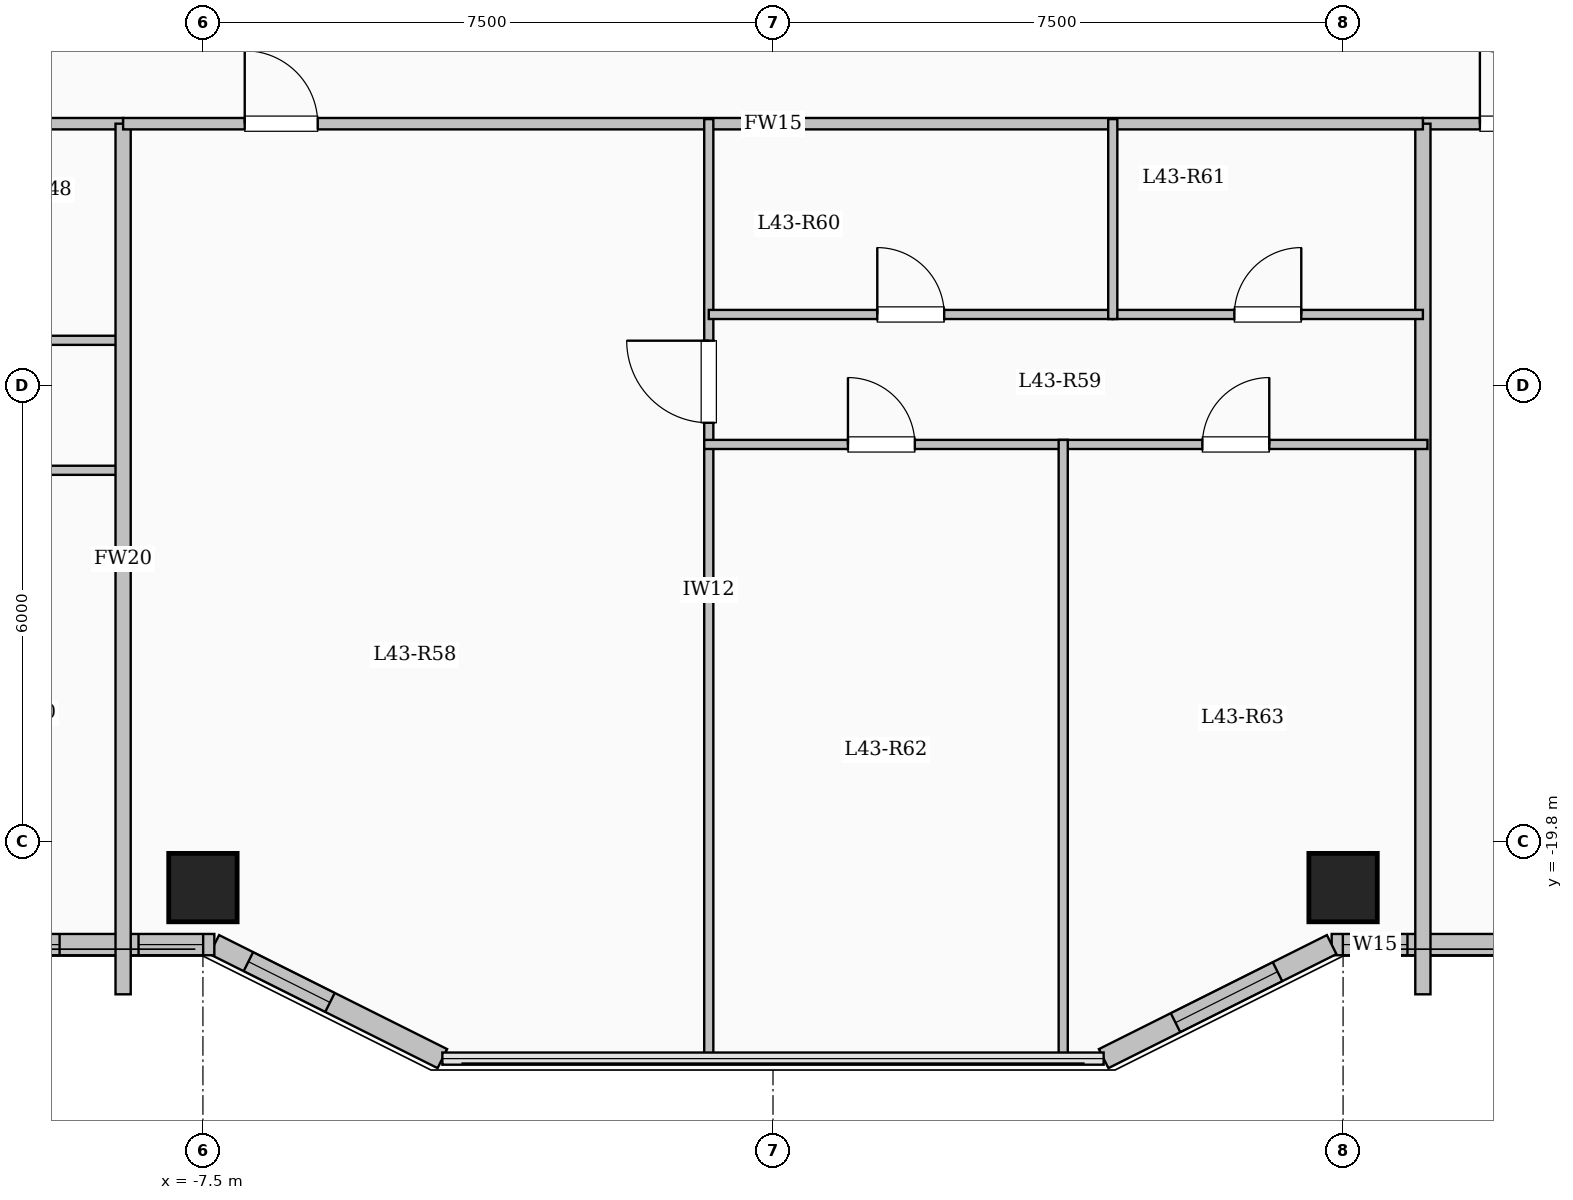
"""IFC4 building model, lengths in metres.
Left out: names, types, materials, properties, quantities, classifications, styles, units other than length and angle.
Written with IfcOpenShell. Run it as: python <this file> out.ifc"""

import sys

from ifc_helpers import new_model, si_unit, direction, frame, frame_2d, origin, origin_2d, place, context, subcontext, project, spatial, rectangle, extrude, element, fill, save


model = new_model("IFC4")
c1 = context("Model", 3, precision=1e-05, world=origin(), true_north=direction((0.0, 1.0)))
c2 = subcontext(c1, "Body", "Model", "MODEL_VIEW")
j1 = project(units=[si_unit("LENGTHUNIT", "METRE"), si_unit("PLANEANGLEUNIT", "RADIAN")], contexts=[c1])
p1 = place(None, origin())
s1 = spatial("IfcSite", under=j1, at=p1, CompositionType="ELEMENT")
p2 = place(p1, origin())
s2 = spatial("IfcBuilding", under=s1, at=p2, CompositionType="ELEMENT")
p3 = place(p2, frame((0.0, 0.0, 159.4)))
s3 = spatial("IfcBuildingStorey", under=s2, at=p3, CompositionType="ELEMENT", Elevation=159.4)
for number, where, z_axis, x_axis in (
    (1, (-7.5, -20.4, 0.0), (0.0, 0.0, 1.0), (1.0, 0.0, 0.0)),
    (2, (7.5, -20.4, 0.0), (0.0, 0.0, 1.0), (1.0, 0.0, 0.0)),
):
    element("IfcColumn", number, at=place(p3, frame(where, z_axis=z_axis, x_axis=x_axis)), inside=s3, PredefinedType="COLUMN", context=c2, shape_type="SweptSolid", body=[
        extrude(rectangle(XDim=0.9, YDim=0.9, at=origin_2d()), origin(), (0.0, 0.0, 1.0), 3.35),
    ])
p4 = place(p3, frame((19.65, -21.15, 0.0), z_axis=(0.0, 0.0, 1.0), x_axis=(-1.0, 0.0, 0.0)))
e3 = element("IfcWall", 3, at=p4, inside=s3, PredefinedType="SOLIDWALL", context=c2, shape_type="SweptSolid", body=[
    extrude(rectangle(XDim=12.3, YDim=0.28, at=frame_2d((6.15, 0.0))), origin(), (0.0, 0.0, 1.0), 3.1),
])
p5 = place(p4, frame((0.881, 0.0, 0.95)))
e4 = element("IfcOpeningElement", 4, at=p5, cuts=e3, PredefinedType="OPENING", context=c2, shape_type="SweptSolid", body=[
    extrude(rectangle(XDim=1.2, YDim=1.5, at=frame_2d((0.6, 0.75))), frame((0.0, 0.15, 0.0), z_axis=(0.0, -1.0, 0.0), x_axis=(1.0, 0.0, 0.0)), (0.0, 0.0, 1.0), 0.3),
])
p6 = place(p4, frame((3.642, 0.0, 0.95)))
e5 = element("IfcOpeningElement", 5, at=p6, cuts=e3, PredefinedType="OPENING", context=c2, shape_type="SweptSolid", body=[
    extrude(rectangle(XDim=1.2, YDim=1.5, at=frame_2d((0.6, 0.75))), frame((0.0, 0.15, 0.0), z_axis=(0.0, -1.0, 0.0), x_axis=(1.0, 0.0, 0.0)), (0.0, 0.0, 1.0), 0.3),
])
p7 = place(p4, frame((7.234, 0.0, 0.9)))
e6 = element("IfcOpeningElement", 6, at=p7, cuts=e3, PredefinedType="OPENING", context=c2, shape_type="SweptSolid", body=[
    extrude(rectangle(XDim=2.2, YDim=1.75, at=frame_2d((1.1, 0.875))), frame((0.0, 0.15, 0.0), z_axis=(0.0, -1.0, 0.0), x_axis=(1.0, 0.0, 0.0)), (0.0, 0.0, 1.0), 0.3),
])
p8 = place(p4, frame((11.303, 0.0, 0.95)))
e7 = element("IfcOpeningElement", 7, at=p8, cuts=e3, PredefinedType="OPENING", context=c2, shape_type="SweptSolid", body=[
    extrude(rectangle(XDim=0.85, YDim=1.5, at=frame_2d((0.425, 0.75))), frame((0.0, 0.15, 0.0), z_axis=(0.0, -1.0, 0.0), x_axis=(1.0, 0.0, 0.0)), (0.0, 0.0, 1.0), 0.3),
])
p9 = place(p3, frame((7.35, -21.15, 0.0), z_axis=(0.0, 0.0, 1.0), x_axis=(-0.894427191, -0.4472135955, 0.0)))
e8 = element("IfcWall", 8, at=p9, inside=s3, PredefinedType="SOLIDWALL", context=c2, shape_type="SweptSolid", body=[
    extrude(rectangle(XDim=3.354, YDim=0.28, at=frame_2d((1.677, 0.0))), origin(), (0.0, 0.0, 1.0), 3.1),
])
p10 = place(p9, frame((0.797, 0.0, 0.9)))
e9 = element("IfcOpeningElement", 9, at=p10, cuts=e8, PredefinedType="OPENING", context=c2, shape_type="SweptSolid", body=[
    extrude(rectangle(XDim=1.5, YDim=1.65, at=frame_2d((0.75, 0.825))), frame((0.0, 0.15, 0.0), z_axis=(0.0, -1.0, 0.0), x_axis=(1.0, 0.0, 0.0)), (0.0, 0.0, 1.0), 0.3),
])
p11 = place(p3, frame((-4.35, -22.65, 0.0), z_axis=(0.0, 0.0, 1.0), x_axis=(-0.894427191, 0.4472135955, 0.0)))
e10 = element("IfcWall", 10, at=p11, inside=s3, PredefinedType="SOLIDWALL", context=c2, shape_type="SweptSolid", body=[
    extrude(rectangle(XDim=3.354, YDim=0.28, at=frame_2d((1.677, 0.0))), origin(), (0.0, 0.0, 1.0), 3.1),
])
p12 = place(p11, frame((1.653, 0.0, 0.95)))
e11 = element("IfcOpeningElement", 11, at=p12, cuts=e10, PredefinedType="OPENING", context=c2, shape_type="SweptSolid", body=[
    extrude(rectangle(XDim=1.2, YDim=1.5, at=frame_2d((0.6, 0.75))), frame((0.0, 0.15, 0.0), z_axis=(0.0, -1.0, 0.0), x_axis=(1.0, 0.0, 0.0)), (0.0, 0.0, 1.0), 0.3),
])
p13 = place(p3, frame((-7.35, -21.15, 0.0), z_axis=(0.0, 0.0, 1.0), x_axis=(-1.0, 0.0, 0.0)))
e12 = element("IfcWall", 12, at=p13, inside=s3, PredefinedType="SOLIDWALL", context=c2, shape_type="SweptSolid", body=[
    extrude(rectangle(XDim=12.3, YDim=0.28, at=frame_2d((6.15, 0.0))), origin(), (0.0, 0.0, 1.0), 3.1),
])
p14 = place(p13, frame((0.147, 0.0, 0.95)))
e13 = element("IfcOpeningElement", 13, at=p14, cuts=e12, PredefinedType="OPENING", context=c2, shape_type="SweptSolid", body=[
    extrude(rectangle(XDim=0.85, YDim=1.5, at=frame_2d((0.425, 0.75))), frame((0.0, 0.15, 0.0), z_axis=(0.0, -1.0, 0.0), x_axis=(1.0, 0.0, 0.0)), (0.0, 0.0, 1.0), 0.3),
])
p15 = place(p13, frame((2.036, 0.0, 0.95)))
e14 = element("IfcOpeningElement", 14, at=p15, cuts=e12, PredefinedType="OPENING", context=c2, shape_type="SweptSolid", body=[
    extrude(rectangle(XDim=1.2, YDim=1.5, at=frame_2d((0.6, 0.75))), frame((0.0, 0.15, 0.0), z_axis=(0.0, -1.0, 0.0), x_axis=(1.0, 0.0, 0.0)), (0.0, 0.0, 1.0), 0.3),
])
p16 = place(p13, frame((4.772, 0.0, 0.95)))
e15 = element("IfcOpeningElement", 15, at=p16, cuts=e12, PredefinedType="OPENING", context=c2, shape_type="SweptSolid", body=[
    extrude(rectangle(XDim=1.2, YDim=1.5, at=frame_2d((0.6, 0.75))), frame((0.0, 0.15, 0.0), z_axis=(0.0, -1.0, 0.0), x_axis=(1.0, 0.0, 0.0)), (0.0, 0.0, 1.0), 0.3),
])
p17 = place(p13, frame((8.364, 0.0, 0.9)))
e16 = element("IfcOpeningElement", 16, at=p17, cuts=e12, PredefinedType="OPENING", context=c2, shape_type="SweptSolid", body=[
    extrude(rectangle(XDim=2.2, YDim=1.75, at=frame_2d((1.1, 0.875))), frame((0.0, 0.15, 0.0), z_axis=(0.0, -1.0, 0.0), x_axis=(1.0, 0.0, 0.0)), (0.0, 0.0, 1.0), 0.3),
])
p18 = place(p3, frame((-19.55, -10.35, 0.0), z_axis=(0.0, 0.0, 1.0), x_axis=(1.0, 0.0, 0.0)))
e17 = element("IfcWall", 17, at=p18, inside=s3, PredefinedType="PARTITIONING", context=c2, shape_type="SweptSolid", body=[
    extrude(rectangle(XDim=11.0, YDim=0.15, at=frame_2d((5.5, 0.0))), origin(), (0.0, 0.0, 1.0), 3.1),
])
p19 = place(p18, frame((0.7, 0.0, 0.0)))
e18 = element("IfcOpeningElement", 18, at=p19, cuts=e17, PredefinedType="OPENING", context=c2, shape_type="SweptSolid", body=[
    extrude(rectangle(XDim=0.96, YDim=2.15, at=frame_2d((0.48, 1.075))), frame((0.0, 0.085, 0.0), z_axis=(0.0, -1.0, 0.0), x_axis=(1.0, 0.0, 0.0)), (0.0, 0.0, 1.0), 0.17),
])
p20 = place(p3, frame((8.55, -10.35, 0.0), z_axis=(0.0, 0.0, 1.0), x_axis=(1.0, 0.0, 0.0)))
e19 = element("IfcWall", 19, at=p20, inside=s3, PredefinedType="PARTITIONING", context=c2, shape_type="SweptSolid", body=[
    extrude(rectangle(XDim=11.0, YDim=0.15, at=frame_2d((5.5, 0.0))), origin(), (0.0, 0.0, 1.0), 3.1),
])
p21 = place(p20, frame((0.75, 0.0, 0.0)))
e20 = element("IfcOpeningElement", 20, at=p21, cuts=e19, PredefinedType="OPENING", context=c2, shape_type="SweptSolid", body=[
    extrude(rectangle(XDim=0.96, YDim=2.15, at=frame_2d((0.48, 1.075))), frame((0.0, 0.085, 0.0), z_axis=(0.0, -1.0, 0.0), x_axis=(1.0, 0.0, 0.0)), (0.0, 0.0, 1.0), 0.17),
])
p22 = place(p3, frame((-11.422, -13.2, 0.0), z_axis=(0.0, 0.0, 1.0), x_axis=(1.0, 0.0, 0.0)))
e21 = element("IfcWall", 21, at=p22, inside=s3, PredefinedType="PARTITIONING", context=c2, shape_type="SweptSolid", body=[
    extrude(rectangle(XDim=2.822, YDim=0.12, at=frame_2d((1.411, 0.0))), origin(), (0.0, 0.0, 1.0), 3.1),
])
p23 = place(p22, frame((0.971, 0.0, 0.0)))
e22 = element("IfcOpeningElement", 22, at=p23, cuts=e21, PredefinedType="OPENING", context=c2, shape_type="SweptSolid", body=[
    extrude(rectangle(XDim=0.88, YDim=2.1, at=frame_2d((0.44, 1.05))), frame((0.0, 0.07, 0.0), z_axis=(0.0, -1.0, 0.0), x_axis=(1.0, 0.0, 0.0)), (0.0, 0.0, 1.0), 0.14),
])
p24 = place(p3, frame((-14.135, -14.91, 0.0), z_axis=(0.0, 0.0, 1.0), x_axis=(1.0, 0.0, 0.0)))
e23 = element("IfcWall", 23, at=p24, inside=s3, PredefinedType="PARTITIONING", context=c2, shape_type="SweptSolid", body=[
    extrude(rectangle(XDim=5.595, YDim=0.12, at=frame_2d((2.797, 0.0))), origin(), (0.0, 0.0, 1.0), 3.1),
])
p25 = place(p24, frame((0.914, 0.0, 0.0)))
e24 = element("IfcOpeningElement", 24, at=p25, cuts=e23, PredefinedType="OPENING", context=c2, shape_type="SweptSolid", body=[
    extrude(rectangle(XDim=0.88, YDim=2.1, at=frame_2d((0.44, 1.05))), frame((0.0, 0.07, 0.0), z_axis=(0.0, -1.0, 0.0), x_axis=(1.0, 0.0, 0.0)), (0.0, 0.0, 1.0), 0.14),
])
p26 = place(p24, frame((3.621, 0.0, 0.0)))
e25 = element("IfcOpeningElement", 25, at=p26, cuts=e23, PredefinedType="OPENING", context=c2, shape_type="SweptSolid", body=[
    extrude(rectangle(XDim=0.88, YDim=2.1, at=frame_2d((0.44, 1.05))), frame((0.0, 0.07, 0.0), z_axis=(0.0, -1.0, 0.0), x_axis=(1.0, 0.0, 0.0)), (0.0, 0.0, 1.0), 0.14),
])
for number, where, z_axis, x_axis in (
    (26, (-8.55, -21.804, 0.0), (0.0, 0.0, 1.0), (0.0, 1.0, 0.0)),
    (27, (8.55, -21.804, 0.0), (0.0, 0.0, 1.0), (0.0, 1.0, 0.0)),
):
    element("IfcWall", number, at=place(p3, frame(where, z_axis=z_axis, x_axis=x_axis)), inside=s3, PredefinedType="SOLIDWALL", context=c2, shape_type="SweptSolid", body=[
        extrude(rectangle(XDim=11.454, YDim=0.2, at=frame_2d((5.727, 0.0))), origin(), (0.0, 0.0, 1.0), 3.1),
    ])
p27 = place(p3, frame((-8.55, -10.35, 0.0), z_axis=(0.0, 0.0, 1.0), x_axis=(1.0, 0.0, 0.0)))
e28 = element("IfcWall", 28, at=p27, inside=s3, PredefinedType="PARTITIONING", context=c2, shape_type="SweptSolid", body=[
    extrude(rectangle(XDim=17.1, YDim=0.15, at=frame_2d((8.55, 0.0))), origin(), (0.0, 0.0, 1.0), 3.1),
])
p28 = place(p27, frame((1.6, 0.0, 0.0)))
e29 = element("IfcOpeningElement", 29, at=p28, cuts=e28, PredefinedType="OPENING", context=c2, shape_type="SweptSolid", body=[
    extrude(rectangle(XDim=0.96, YDim=2.15, at=frame_2d((0.48, 1.075))), frame((0.0, 0.085, 0.0), z_axis=(0.0, -1.0, 0.0), x_axis=(1.0, 0.0, 0.0)), (0.0, 0.0, 1.0), 0.17),
])
p29 = place(p3, frame((-0.845, -22.68, 0.0), z_axis=(0.0, 0.0, 1.0), x_axis=(0.0, 1.0, 0.0)))
e30 = element("IfcWall", 30, at=p29, inside=s3, PredefinedType="PARTITIONING", context=c2, shape_type="SweptSolid", body=[
    extrude(rectangle(XDim=12.39, YDim=0.12, at=frame_2d((6.195, 0.0))), origin(), (0.0, 0.0, 1.0), 3.1),
])
p30 = place(p29, frame((8.395, 0.0, 0.0)))
e31 = element("IfcOpeningElement", 31, at=p30, cuts=e30, PredefinedType="OPENING", context=c2, shape_type="SweptSolid", body=[
    extrude(rectangle(XDim=1.08, YDim=2.15, at=frame_2d((0.54, 1.075))), frame((0.0, 0.07, 0.0), z_axis=(0.0, -1.0, 0.0), x_axis=(1.0, 0.0, 0.0)), (0.0, 0.0, 1.0), 0.14),
])
p31 = place(p3, frame((-0.845, -12.86, 0.0), z_axis=(0.0, 0.0, 1.0), x_axis=(1.0, 0.0, 0.0)))
e32 = element("IfcWall", 32, at=p31, inside=s3, PredefinedType="PARTITIONING", context=c2, shape_type="SweptSolid", body=[
    extrude(rectangle(XDim=5.315, YDim=0.12, at=frame_2d((2.657, 0.0))), origin(), (0.0, 0.0, 1.0), 3.1),
])
p32 = place(p31, frame((2.217, 0.0, 0.0)))
e33 = element("IfcOpeningElement", 33, at=p32, cuts=e32, PredefinedType="OPENING", context=c2, shape_type="SweptSolid", body=[
    extrude(rectangle(XDim=0.88, YDim=2.1, at=frame_2d((0.44, 1.05))), frame((0.0, 0.07, 0.0), z_axis=(0.0, -1.0, 0.0), x_axis=(1.0, 0.0, 0.0)), (0.0, 0.0, 1.0), 0.14),
])
p33 = place(p3, frame((4.47, -12.86, 0.0), z_axis=(0.0, 0.0, 1.0), x_axis=(1.0, 0.0, 0.0)))
e34 = element("IfcWall", 34, at=p33, inside=s3, PredefinedType="PARTITIONING", context=c2, shape_type="SweptSolid", body=[
    extrude(rectangle(XDim=4.08, YDim=0.12, at=frame_2d((2.04, 0.0))), origin(), (0.0, 0.0, 1.0), 3.1),
])
p34 = place(p33, frame((1.6, 0.0, 0.0)))
e35 = element("IfcOpeningElement", 35, at=p34, cuts=e34, PredefinedType="OPENING", context=c2, shape_type="SweptSolid", body=[
    extrude(rectangle(XDim=0.88, YDim=2.1, at=frame_2d((0.44, 1.05))), frame((0.0, 0.07, 0.0), z_axis=(0.0, -1.0, 0.0), x_axis=(1.0, 0.0, 0.0)), (0.0, 0.0, 1.0), 0.14),
])
p35 = place(p3, frame((-0.905, -14.57, 0.0), z_axis=(0.0, 0.0, 1.0), x_axis=(1.0, 0.0, 0.0)))
e36 = element("IfcWall", 36, at=p35, inside=s3, PredefinedType="PARTITIONING", context=c2, shape_type="SweptSolid", body=[
    extrude(rectangle(XDim=9.515, YDim=0.12, at=frame_2d((4.758, 0.0))), origin(), (0.0, 0.0, 1.0), 3.1),
])
p36 = place(p35, frame((1.891, 0.0, 0.0)))
e37 = element("IfcOpeningElement", 37, at=p36, cuts=e36, PredefinedType="OPENING", context=c2, shape_type="SweptSolid", body=[
    extrude(rectangle(XDim=0.88, YDim=2.1, at=frame_2d((0.44, 1.05))), frame((0.0, 0.07, 0.0), z_axis=(0.0, -1.0, 0.0), x_axis=(1.0, 0.0, 0.0)), (0.0, 0.0, 1.0), 0.14),
])
p37 = place(p35, frame((6.554, 0.0, 0.0)))
e38 = element("IfcOpeningElement", 38, at=p37, cuts=e36, PredefinedType="OPENING", context=c2, shape_type="SweptSolid", body=[
    extrude(rectangle(XDim=0.88, YDim=2.1, at=frame_2d((0.44, 1.05))), frame((0.0, 0.07, 0.0), z_axis=(0.0, -1.0, 0.0), x_axis=(1.0, 0.0, 0.0)), (0.0, 0.0, 1.0), 0.14),
])
p38 = place(p3, frame((4.47, -12.92, 0.0), z_axis=(0.0, 0.0, 1.0), x_axis=(0.0, 1.0, 0.0)))
e39 = element("IfcWall", 39, at=p38, inside=s3, PredefinedType="PARTITIONING", context=c2, shape_type="SweptSolid", body=[
    extrude(rectangle(XDim=2.63, YDim=0.12, at=frame_2d((1.315, 0.0))), origin(), (0.0, 0.0, 1.0), 3.1),
])
p39 = place(p3, frame((3.818, -22.68, 0.0), z_axis=(0.0, 0.0, 1.0), x_axis=(0.0, 1.0, 0.0)))
e40 = element("IfcWall", 40, at=p39, inside=s3, PredefinedType="PARTITIONING", context=c2, shape_type="SweptSolid", body=[
    extrude(rectangle(XDim=8.17, YDim=0.12, at=frame_2d((4.085, 0.0))), origin(), (0.0, 0.0, 1.0), 3.1),
])
p40 = place(p8, origin())
e41 = element("IfcWindow", 41, at=p40, inside=s3, PartitioningType="SINGLE_PANEL", PredefinedType="WINDOW", context=c2, shape_type="SweptSolid", body=[
    extrude(rectangle(XDim=0.85, YDim=1.5, at=frame_2d((0.425, 0.75))), frame((0.0, 0.03, 0.0), z_axis=(0.0, -1.0, 0.0), x_axis=(1.0, 0.0, 0.0)), (0.0, 0.0, 1.0), 0.06),
])
fill(e7, e41)
p41 = place(p10, origin())
e42 = element("IfcWindow", 42, at=p41, inside=s3, PartitioningType="SINGLE_PANEL", PredefinedType="WINDOW", context=c2, shape_type="SweptSolid", body=[
    extrude(rectangle(XDim=1.5, YDim=1.65, at=frame_2d((0.75, 0.825))), frame((0.0, 0.03, 0.0), z_axis=(0.0, -1.0, 0.0), x_axis=(1.0, 0.0, 0.0)), (0.0, 0.0, 1.0), 0.06),
])
fill(e9, e42)
p42 = place(p12, origin())
e43 = element("IfcWindow", 43, at=p42, inside=s3, PartitioningType="SINGLE_PANEL", PredefinedType="WINDOW", context=c2, shape_type="SweptSolid", body=[
    extrude(rectangle(XDim=1.2, YDim=1.5, at=frame_2d((0.6, 0.75))), frame((0.0, 0.03, 0.0), z_axis=(0.0, -1.0, 0.0), x_axis=(1.0, 0.0, 0.0)), (0.0, 0.0, 1.0), 0.06),
])
fill(e11, e43)
p43 = place(p14, origin())
e44 = element("IfcWindow", 44, at=p43, inside=s3, PartitioningType="SINGLE_PANEL", PredefinedType="WINDOW", context=c2, shape_type="SweptSolid", body=[
    extrude(rectangle(XDim=0.85, YDim=1.5, at=frame_2d((0.425, 0.75))), frame((0.0, 0.03, 0.0), z_axis=(0.0, -1.0, 0.0), x_axis=(1.0, 0.0, 0.0)), (0.0, 0.0, 1.0), 0.06),
])
fill(e13, e44)
p44 = place(p15, origin())
e45 = element("IfcWindow", 45, at=p44, inside=s3, PartitioningType="SINGLE_PANEL", PredefinedType="WINDOW", context=c2, shape_type="SweptSolid", body=[
    extrude(rectangle(XDim=1.2, YDim=1.5, at=frame_2d((0.6, 0.75))), frame((0.0, 0.03, 0.0), z_axis=(0.0, -1.0, 0.0), x_axis=(1.0, 0.0, 0.0)), (0.0, 0.0, 1.0), 0.06),
])
fill(e14, e45)
p45 = place(p21, origin())
e46 = element("IfcDoor", 46, at=p45, inside=s3, OperationType="SINGLE_SWING_LEFT", PredefinedType="DOOR", context=c2, shape_type="SweptSolid", body=[
    extrude(rectangle(XDim=0.96, YDim=2.15, at=frame_2d((0.48, 1.075))), frame((0.0, 0.025, 0.0), z_axis=(0.0, -1.0, 0.0), x_axis=(1.0, 0.0, 0.0)), (0.0, 0.0, 1.0), 0.05),
])
fill(e20, e46)
p46 = place(p28, origin())
e47 = element("IfcDoor", 47, at=p46, inside=s3, OperationType="SINGLE_SWING_LEFT", PredefinedType="DOOR", context=c2, shape_type="SweptSolid", body=[
    extrude(rectangle(XDim=0.96, YDim=2.15, at=frame_2d((0.48, 1.075))), frame((0.0, 0.025, 0.0), z_axis=(0.0, -1.0, 0.0), x_axis=(1.0, 0.0, 0.0)), (0.0, 0.0, 1.0), 0.05),
])
fill(e29, e47)
p47 = place(p30, origin())
e48 = element("IfcDoor", 48, at=p47, inside=s3, OperationType="SINGLE_SWING_RIGHT", PredefinedType="DOOR", context=c2, shape_type="SweptSolid", body=[
    extrude(rectangle(XDim=1.08, YDim=2.15, at=frame_2d((0.54, 1.075))), frame((0.0, 0.025, 0.0), z_axis=(0.0, -1.0, 0.0), x_axis=(1.0, 0.0, 0.0)), (0.0, 0.0, 1.0), 0.05),
])
fill(e31, e48)
p48 = place(p32, origin())
e49 = element("IfcDoor", 49, at=p48, inside=s3, OperationType="SINGLE_SWING_LEFT", PredefinedType="DOOR", context=c2, shape_type="SweptSolid", body=[
    extrude(rectangle(XDim=0.88, YDim=2.1, at=frame_2d((0.44, 1.05))), frame((0.0, 0.025, 0.0), z_axis=(0.0, -1.0, 0.0), x_axis=(1.0, 0.0, 0.0)), (0.0, 0.0, 1.0), 0.05),
])
fill(e33, e49)
p49 = place(p34, origin())
e50 = element("IfcDoor", 50, at=p49, inside=s3, OperationType="SINGLE_SWING_RIGHT", PredefinedType="DOOR", context=c2, shape_type="SweptSolid", body=[
    extrude(rectangle(XDim=0.88, YDim=2.1, at=frame_2d((0.44, 1.05))), frame((0.0, 0.025, 0.0), z_axis=(0.0, -1.0, 0.0), x_axis=(1.0, 0.0, 0.0)), (0.0, 0.0, 1.0), 0.05),
])
fill(e35, e50)
p50 = place(p36, origin())
e51 = element("IfcDoor", 51, at=p50, inside=s3, OperationType="SINGLE_SWING_LEFT", PredefinedType="DOOR", context=c2, shape_type="SweptSolid", body=[
    extrude(rectangle(XDim=0.88, YDim=2.1, at=frame_2d((0.44, 1.05))), frame((0.0, 0.025, 0.0), z_axis=(0.0, -1.0, 0.0), x_axis=(1.0, 0.0, 0.0)), (0.0, 0.0, 1.0), 0.05),
])
fill(e37, e51)
p51 = place(p37, origin())
e52 = element("IfcDoor", 52, at=p51, inside=s3, OperationType="SINGLE_SWING_RIGHT", PredefinedType="DOOR", context=c2, shape_type="SweptSolid", body=[
    extrude(rectangle(XDim=0.88, YDim=2.1, at=frame_2d((0.44, 1.05))), frame((0.0, 0.025, 0.0), z_axis=(0.0, -1.0, 0.0), x_axis=(1.0, 0.0, 0.0)), (0.0, 0.0, 1.0), 0.05),
])
fill(e38, e52)
save(model, sys.argv[1])
